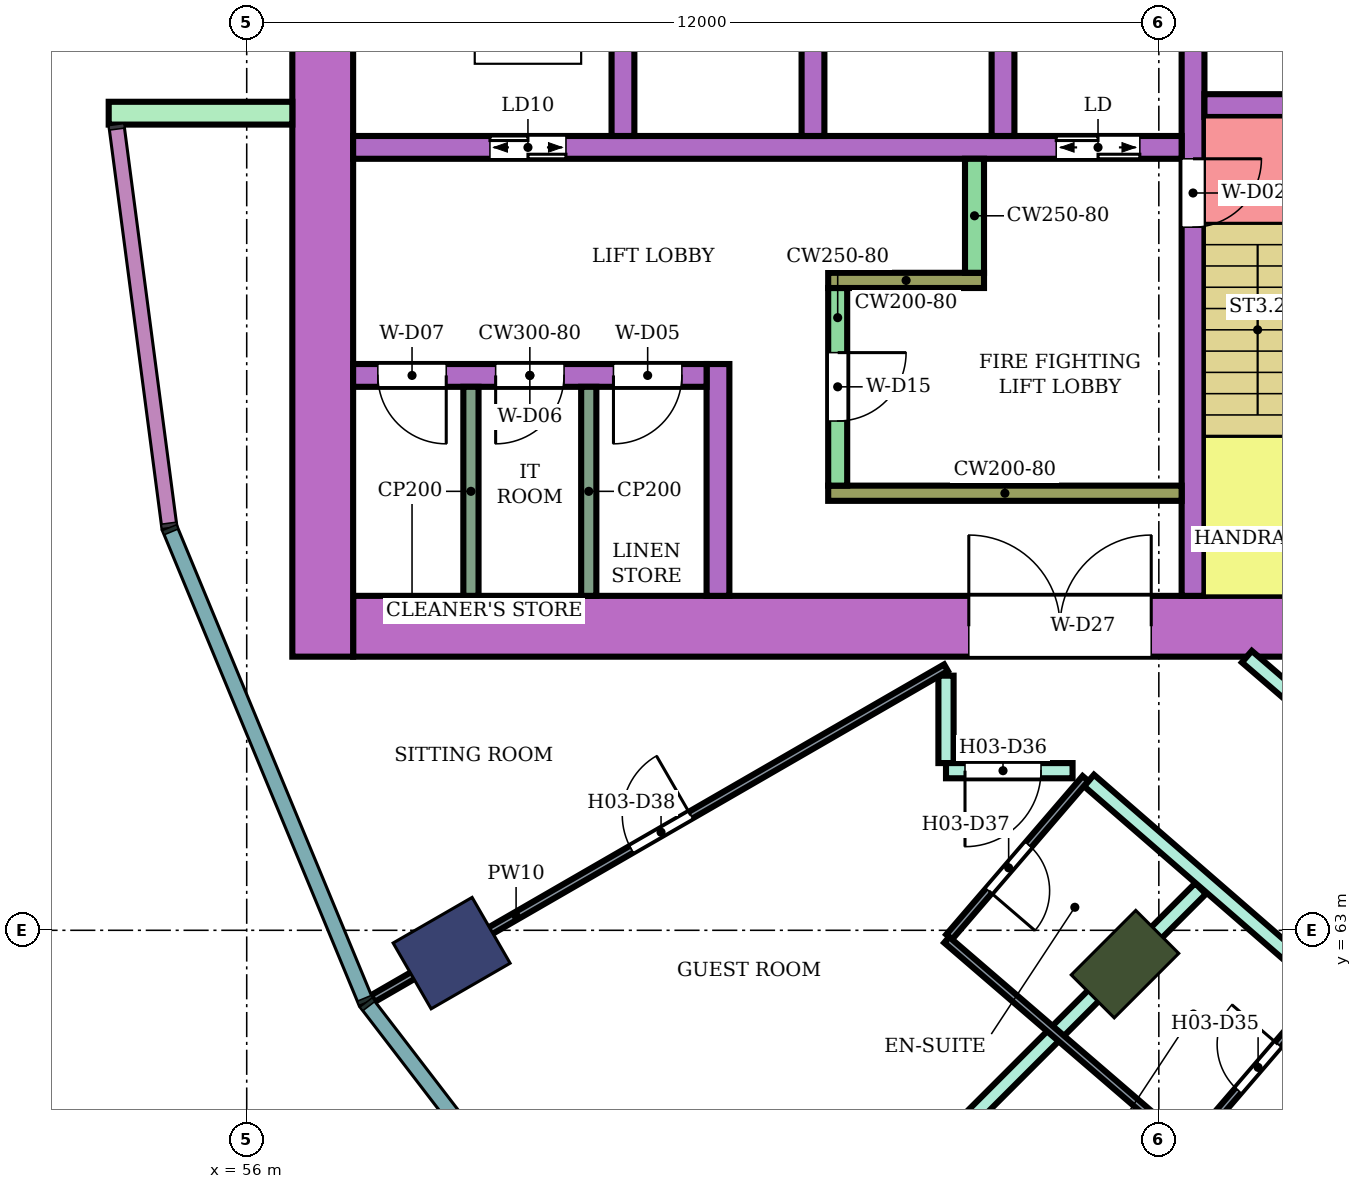
"""IFC4 building model, lengths in metres.
Left out: names, types, materials, properties, quantities, classifications, styles, units other than length and angle.
Written with IfcOpenShell. Run it as: python <this file> out.ifc"""

import sys

from ifc_helpers import new_model, si_unit, direction, frame, frame_2d, origin, origin_2d, place, context, subcontext, project, spatial, rectangle, extrude, element, fill, save


model = new_model("IFC4")
c1 = context("Model", 3, precision=1e-05, world=origin(), true_north=direction((0.0, 1.0)))
c2 = subcontext(c1, "Body", "Model", "MODEL_VIEW")
j1 = project(units=[si_unit("LENGTHUNIT", "METRE"), si_unit("PLANEANGLEUNIT", "RADIAN")], contexts=[c1])
p1 = place(None, origin())
s1 = spatial("IfcSite", under=j1, at=p1, CompositionType="ELEMENT")
p2 = place(p1, origin())
s2 = spatial("IfcBuilding", under=s1, at=p2, CompositionType="ELEMENT")
p3 = place(p2, frame((0.0, 0.0, 51.6)))
s3 = spatial("IfcBuildingStorey", under=s2, at=p3, CompositionType="ELEMENT", Elevation=51.6)
p4 = place(p3, frame((58.696, 62.7, 0.0), z_axis=(0.0, 0.0, 1.0), x_axis=(-0.866025403784, -0.5, 0.0)))
e1 = element("IfcColumn", 1, at=p4, inside=s3, PredefinedType="COLUMN", context=c2, shape_type="SweptSolid", body=[
    extrude(rectangle(XDim=1.2, YDim=1.0, at=origin_2d()), origin(), (0.0, 0.0, 1.0), 3.8),
])
p5 = place(p3, frame((67.555, 62.555, 0.0), z_axis=(0.0, 0.0, 1.0), x_axis=(-0.707106781187, -0.707106781187, 0.0)))
e2 = element("IfcColumn", 2, at=p5, inside=s3, PredefinedType="COLUMN", context=c2, shape_type="SweptSolid", body=[
    extrude(rectangle(XDim=1.2, YDim=0.8, at=origin_2d()), origin(), (0.0, 0.0, 1.0), 3.8),
])
p6 = place(p3, frame((72.1, 67.0, 0.0), z_axis=(0.0, 0.0, 1.0), x_axis=(-1.0, 0.0, 0.0)))
e3 = element("IfcWall", 3, at=p6, inside=s3, PredefinedType="SHEAR", context=c2, shape_type="SweptSolid", body=[
    extrude(rectangle(XDim=14.7, YDim=0.8, at=frame_2d((7.35, 0.0))), origin(), (0.0, 0.0, 1.0), 3.48),
])
p7 = place(p6, frame((4.2, 0.0, 0.0)))
e4 = element("IfcOpeningElement", 4, at=p7, cuts=e3, PredefinedType="OPENING", context=c2, shape_type="SweptSolid", body=[
    extrude(rectangle(XDim=2.4, YDim=2.4, at=frame_2d((1.2, 1.2))), frame((0.0, 0.41, 0.0), z_axis=(0.0, -1.0, 0.0), x_axis=(1.0, 0.0, 0.0)), (0.0, 0.0, 1.0), 0.82),
])
p8 = place(p3, frame((57.0, 83.4, 0.0), z_axis=(0.0, 0.0, 1.0), x_axis=(0.0, -1.0, 0.0)))
e5 = element("IfcWall", 5, at=p8, inside=s3, PredefinedType="SHEAR", context=c2, shape_type="SweptSolid", body=[
    extrude(rectangle(XDim=16.8, YDim=0.8, at=frame_2d((8.4, 0.0))), origin(), (0.0, 0.0, 1.0), 3.48),
])
p9 = place(p3, frame((68.45, 75.0, 0.0), z_axis=(0.0, 0.0, 1.0), x_axis=(0.0, -1.0, 0.0)))
e6 = element("IfcWall", 6, at=p9, inside=s3, PredefinedType="SHEAR", context=c2, shape_type="SweptSolid", body=[
    extrude(rectangle(XDim=7.6, YDim=0.3, at=frame_2d((3.8, 0.0))), origin(), (0.0, 0.0, 1.0), 3.48),
])
p10 = place(p9, frame((1.85, 0.0, 0.0)))
e7 = element("IfcOpeningElement", 7, at=p10, cuts=e6, PredefinedType="OPENING", context=c2, shape_type="SweptSolid", body=[
    extrude(rectangle(XDim=0.9, YDim=2.1, at=frame_2d((0.45, 1.05))), frame((0.0, 0.16, 0.0), z_axis=(0.0, -1.0, 0.0), x_axis=(1.0, 0.0, 0.0)), (0.0, 0.0, 1.0), 0.32),
])
p11 = place(p3, frame((71.65, 73.85, 0.0), z_axis=(0.0, 0.0, 1.0), x_axis=(-1.0, 0.0, 0.0)))
e8 = element("IfcWall", 8, at=p11, inside=s3, PredefinedType="SHEAR", context=c2, shape_type="SweptSolid", body=[
    extrude(rectangle(XDim=3.05, YDim=0.3, at=frame_2d((1.525, 0.0))), origin(), (0.0, 0.0, 1.0), 3.48),
])
p12 = place(p11, frame((1.1, 0.0, 0.0)))
e9 = element("IfcOpeningElement", 9, at=p12, cuts=e8, PredefinedType="OPENING", context=c2, shape_type="SweptSolid", body=[
    extrude(rectangle(XDim=0.7, YDim=2.0, at=frame_2d((0.35, 1.0))), frame((0.0, 0.16, 0.0), z_axis=(0.0, -1.0, 0.0), x_axis=(1.0, 0.0, 0.0)), (0.0, 0.0, 1.0), 0.32),
])
p13 = place(p3, frame((68.3, 73.3, 0.0), z_axis=(0.0, 0.0, 1.0), x_axis=(-1.0, 0.0, 0.0)))
e10 = element("IfcWall", 10, at=p13, inside=s3, PredefinedType="SHEAR", context=c2, shape_type="SweptSolid", body=[
    extrude(rectangle(XDim=10.9, YDim=0.3, at=frame_2d((5.45, 0.0))), origin(), (0.0, 0.0, 1.0), 3.48),
])
p14 = place(p13, frame((0.55, 0.0, 0.0)))
e11 = element("IfcOpeningElement", 11, at=p14, cuts=e10, PredefinedType="OPENING", context=c2, shape_type="SweptSolid", body=[
    extrude(rectangle(XDim=1.1, YDim=2.1, at=frame_2d((0.55, 1.05))), frame((0.0, 0.16, 0.0), z_axis=(0.0, -1.0, 0.0), x_axis=(1.0, 0.0, 0.0)), (0.0, 0.0, 1.0), 0.32),
])
p15 = place(p13, frame((8.1, 0.0, 0.0)))
e12 = element("IfcOpeningElement", 12, at=p15, cuts=e10, PredefinedType="OPENING", context=c2, shape_type="SweptSolid", body=[
    extrude(rectangle(XDim=1.0, YDim=2.1, at=frame_2d((0.5, 1.05))), frame((0.0, 0.16, 0.0), z_axis=(0.0, -1.0, 0.0), x_axis=(1.0, 0.0, 0.0)), (0.0, 0.0, 1.0), 0.32),
])
for number, where, z_axis, x_axis in (
    (13, (65.95, 76.0, 0.0), (0.0, 0.0, 1.0), (0.0, -1.0, 0.0)),
    (14, (63.45, 76.0, 0.0), (0.0, 0.0, 1.0), (0.0, -1.0, 0.0)),
    (15, (60.95, 76.0, 0.0), (0.0, 0.0, 1.0), (0.0, -1.0, 0.0)),
):
    element("IfcWall", number, at=place(p3, frame(where, z_axis=z_axis, x_axis=x_axis)), inside=s3, PredefinedType="SHEAR", context=c2, shape_type="SweptSolid", body=[
        extrude(rectangle(XDim=2.55, YDim=0.3, at=frame_2d((1.275, 0.0))), origin(), (0.0, 0.0, 1.0), 3.48),
    ])
p16 = place(p3, frame((68.3, 68.75, 0.0), z_axis=(0.0, 0.0, 1.0), x_axis=(-1.0, 0.0, 0.0)))
e16 = element("IfcWall", 16, at=p16, inside=s3, PredefinedType="SHEAR", context=c2, shape_type="SweptSolid", body=[
    extrude(rectangle(XDim=4.65, YDim=0.2, at=frame_2d((2.325, 0.0))), origin(), (0.0, 0.0, 1.0), 3.48),
])
p17 = place(p3, frame((63.775, 71.45, 0.0), z_axis=(0.0, 0.0, 1.0), x_axis=(0.0, -1.0, 0.0)))
e17 = element("IfcWall", 17, at=p17, inside=s3, PredefinedType="SHEAR", context=c2, shape_type="SweptSolid", body=[
    extrude(rectangle(XDim=2.6, YDim=0.25, at=frame_2d((1.3, 0.0))), origin(), (0.0, 0.0, 1.0), 3.48),
])
p18 = place(p17, frame((0.85, 0.0, 0.0)))
e18 = element("IfcOpeningElement", 18, at=p18, cuts=e17, PredefinedType="OPENING", context=c2, shape_type="SweptSolid", body=[
    extrude(rectangle(XDim=0.9, YDim=2.1, at=frame_2d((0.45, 1.05))), frame((0.0, 0.135, 0.0), z_axis=(0.0, -1.0, 0.0), x_axis=(1.0, 0.0, 0.0)), (0.0, 0.0, 1.0), 0.27),
])
p19 = place(p3, frame((65.7, 71.55, 0.0), z_axis=(0.0, 0.0, 1.0), x_axis=(-1.0, 0.0, 0.0)))
e19 = element("IfcWall", 19, at=p19, inside=s3, PredefinedType="SHEAR", context=c2, shape_type="SweptSolid", body=[
    extrude(rectangle(XDim=2.05, YDim=0.2, at=frame_2d((1.025, 0.0))), origin(), (0.0, 0.0, 1.0), 3.48),
])
p20 = place(p3, frame((65.575, 73.15, 0.0), z_axis=(0.0, 0.0, 1.0), x_axis=(0.0, -1.0, 0.0)))
e20 = element("IfcWall", 20, at=p20, inside=s3, PredefinedType="SHEAR", context=c2, shape_type="SweptSolid", body=[
    extrude(rectangle(XDim=1.5, YDim=0.25, at=frame_2d((0.75, 0.0))), origin(), (0.0, 0.0, 1.0), 3.48),
])
p21 = place(p3, frame((62.2, 70.45, 0.0), z_axis=(0.0, 0.0, 1.0), x_axis=(0.0, -1.0, 0.0)))
e21 = element("IfcWall", 21, at=p21, inside=s3, PredefinedType="SHEAR", context=c2, shape_type="SweptSolid", body=[
    extrude(rectangle(XDim=3.05, YDim=0.3, at=frame_2d((1.525, 0.0))), origin(), (0.0, 0.0, 1.0), 3.48),
])
p22 = place(p3, frame((62.05, 70.3, 0.0), z_axis=(0.0, 0.0, 1.0), x_axis=(-1.0, 0.0, 0.0)))
e22 = element("IfcWall", 22, at=p22, inside=s3, PredefinedType="SHEAR", context=c2, shape_type="SweptSolid", body=[
    extrude(rectangle(XDim=4.65, YDim=0.3, at=frame_2d((2.325, 0.0))), origin(), (0.0, 0.0, 1.0), 3.48),
])
p23 = place(p22, frame((0.325, 0.0, 0.0)))
e23 = element("IfcOpeningElement", 23, at=p23, cuts=e22, PredefinedType="OPENING", context=c2, shape_type="SweptSolid", body=[
    extrude(rectangle(XDim=0.9, YDim=2.1, at=frame_2d((0.45, 1.05))), frame((0.0, 0.16, 0.0), z_axis=(0.0, -1.0, 0.0), x_axis=(1.0, 0.0, 0.0)), (0.0, 0.0, 1.0), 0.32),
])
p24 = place(p22, frame((1.875, 0.0, 0.0)))
e24 = element("IfcOpeningElement", 24, at=p24, cuts=e22, PredefinedType="OPENING", context=c2, shape_type="SweptSolid", body=[
    extrude(rectangle(XDim=0.9, YDim=2.1, at=frame_2d((0.45, 1.05))), frame((0.0, 0.16, 0.0), z_axis=(0.0, -1.0, 0.0), x_axis=(1.0, 0.0, 0.0)), (0.0, 0.0, 1.0), 0.32),
])
p25 = place(p22, frame((3.425, 0.0, 0.0)))
e25 = element("IfcOpeningElement", 25, at=p25, cuts=e22, PredefinedType="OPENING", context=c2, shape_type="SweptSolid", body=[
    extrude(rectangle(XDim=0.9, YDim=2.1, at=frame_2d((0.45, 1.05))), frame((0.0, 0.16, 0.0), z_axis=(0.0, -1.0, 0.0), x_axis=(1.0, 0.0, 0.0)), (0.0, 0.0, 1.0), 0.32),
])
p26 = place(p3, frame((56.6, 73.75, 0.0), z_axis=(0.0, 0.0, 1.0), x_axis=(-1.0, 0.0, 0.0)))
e26 = element("IfcWall", 26, at=p26, inside=s3, PredefinedType="NOTDEFINED", context=c2, shape_type="SweptSolid", body=[
    extrude(rectangle(XDim=2.416, YDim=0.3, at=frame_2d((1.208, 0.0))), origin(), (0.0, 0.0, 1.0), 3.8),
])
p27 = place(p3, frame((63.596, 58.596, 0.0), z_axis=(0.0, 0.0, 1.0), x_axis=(0.707106781187, 0.707106781187, 0.0)))
e27 = element("IfcWall", 27, at=p27, inside=s3, PredefinedType="PARTITIONING", context=c2, shape_type="SweptSolid", body=[
    extrude(rectangle(XDim=7.005, YDim=0.2, at=frame_2d((3.503, 0.0))), origin(), (0.0, 0.0, 1.0), 3.35),
])
p28 = place(p3, frame((65.2, 65.2, 0.0), z_axis=(0.0, 0.0, 1.0), x_axis=(0.0, 1.0, 0.0)))
e28 = element("IfcWall", 28, at=p28, inside=s3, PredefinedType="PARTITIONING", context=c2, shape_type="SweptSolid", body=[
    extrude(rectangle(XDim=1.15, YDim=0.2, at=frame_2d((0.575, 0.0))), origin(), (0.0, 0.0, 1.0), 3.35),
])
p29 = place(p3, frame((65.2, 65.1, 0.0), z_axis=(0.0, 0.0, 1.0), x_axis=(1.0, 0.0, 0.0)))
e29 = element("IfcWall", 29, at=p29, inside=s3, PredefinedType="PARTITIONING", context=c2, shape_type="SweptSolid", body=[
    extrude(rectangle(XDim=1.665, YDim=0.2, at=frame_2d((0.833, 0.0))), origin(), (0.0, 0.0, 1.0), 3.35),
])
p30 = place(p29, frame((0.25, 0.0, 0.0)))
e30 = element("IfcOpeningElement", 30, at=p30, cuts=e29, PredefinedType="OPENING", context=c2, shape_type="SweptSolid", body=[
    extrude(rectangle(XDim=1.0, YDim=2.1, at=frame_2d((0.5, 1.05))), frame((0.0, 0.11, 0.0), z_axis=(0.0, -1.0, 0.0), x_axis=(1.0, 0.0, 0.0)), (0.0, 0.0, 1.0), 0.22),
])
p31 = place(p3, frame((67.081, 64.971, 0.0), z_axis=(0.0, 0.0, 1.0), x_axis=(0.755031061605, -0.65568902386, 0.0)))
e31 = element("IfcWall", 31, at=p31, inside=s3, PredefinedType="PARTITIONING", context=c2, shape_type="SweptSolid", body=[
    extrude(rectangle(XDim=6.186, YDim=0.2, at=frame_2d((3.093, 0.0))), origin(), (0.0, 0.0, 1.0), 3.35),
])
p32 = place(p31, frame((4.755, 0.0, 0.0)))
e32 = element("IfcOpeningElement", 32, at=p32, cuts=e31, PredefinedType="OPENING", context=c2, shape_type="SweptSolid", body=[
    extrude(rectangle(XDim=1.0, YDim=2.1, at=frame_2d((0.5, 1.05))), frame((0.0, 0.11, 0.0), z_axis=(0.0, -1.0, 0.0), x_axis=(1.0, 0.0, 0.0)), (0.0, 0.0, 1.0), 0.22),
])
p33 = place(p3, frame((67.095, 52.662, 0.0), z_axis=(0.0, 0.0, 1.0), x_axis=(0.500247659952, 0.865882370021, 0.0)))
e33 = element("IfcWall", 33, at=p33, inside=s3, PredefinedType="PARTITIONING", context=c2, shape_type="SweptSolid", body=[
    extrude(rectangle(XDim=9.375, YDim=0.2, at=frame_2d((4.688, 0.0))), origin(), (0.0, 0.0, 1.0), 3.35),
])
p34 = place(p3, frame((69.158, 66.6, 0.0), z_axis=(0.0, 0.0, 1.0), x_axis=(0.757976058094, -0.652282373943, 0.0)))
e34 = element("IfcWall", 34, at=p34, inside=s3, PredefinedType="PARTITIONING", context=c2, shape_type="SweptSolid", body=[
    extrude(rectangle(XDim=5.16, YDim=0.2, at=frame_2d((2.58, 0.0))), origin(), (0.0, 0.0, 1.0), 3.35),
])
p35 = place(p34, frame((1.6, 0.0, 0.0)))
e35 = element("IfcOpeningElement", 35, at=p35, cuts=e34, PredefinedType="OPENING", context=c2, shape_type="SweptSolid", body=[
    extrude(rectangle(XDim=1.0, YDim=2.1, at=frame_2d((0.5, 1.05))), frame((0.0, 0.11, 0.0), z_axis=(0.0, -1.0, 0.0), x_axis=(1.0, 0.0, 0.0)), (0.0, 0.0, 1.0), 0.22),
])
p36 = place(p3, frame((57.659, 62.101, 0.0), z_axis=(0.0, 0.0, 1.0), x_axis=(0.86602264145, 0.500004784474, 0.0)))
e36 = element("IfcWall", 36, at=p36, inside=s3, PredefinedType="PARTITIONING", context=c2, shape_type="SweptSolid", body=[
    extrude(rectangle(XDim=8.708, YDim=0.1, at=frame_2d((4.354, 0.0))), origin(), (0.0, 0.0, 1.0), 3.35),
])
p37 = place(p36, frame((3.929, 0.0, 0.0)))
e37 = element("IfcOpeningElement", 37, at=p37, cuts=e36, PredefinedType="OPENING", context=c2, shape_type="SweptSolid", body=[
    extrude(rectangle(XDim=0.9, YDim=2.1, at=frame_2d((0.45, 1.05))), frame((0.0, 0.06, 0.0), z_axis=(0.0, -1.0, 0.0), x_axis=(1.0, 0.0, 0.0)), (0.0, 0.0, 1.0), 0.12),
])
p38 = place(p3, frame((65.242, 62.912, 0.0), z_axis=(0.0, 0.0, 1.0), x_axis=(0.652069888227, 0.758158862553, 0.0)))
e38 = element("IfcWall", 38, at=p38, inside=s3, PredefinedType="PARTITIONING", context=c2, shape_type="SweptSolid", body=[
    extrude(rectangle(XDim=2.75, YDim=0.1, at=frame_2d((1.375, 0.0))), origin(), (0.0, 0.0, 1.0), 3.35),
])
p39 = place(p38, frame((0.8, 0.0, 0.0)))
e39 = element("IfcOpeningElement", 39, at=p39, cuts=e38, PredefinedType="OPENING", context=c2, shape_type="SweptSolid", body=[
    extrude(rectangle(XDim=0.8, YDim=2.1, at=frame_2d((0.4, 1.05))), frame((0.0, 0.06, 0.0), z_axis=(0.0, -1.0, 0.0), x_axis=(1.0, 0.0, 0.0)), (0.0, 0.0, 1.0), 0.12),
])
p40 = place(p3, frame((65.209, 62.875, 0.0), z_axis=(0.0, 0.0, 1.0), x_axis=(0.757930378138, -0.652335451969, 0.0)))
e40 = element("IfcWall", 40, at=p40, inside=s3, PredefinedType="PARTITIONING", context=c2, shape_type="SweptSolid", body=[
    extrude(rectangle(XDim=4.15, YDim=0.1, at=frame_2d((2.075, 0.0))), origin(), (0.0, 0.0, 1.0), 3.35),
])
p41 = place(p3, frame((68.393, 60.135, 0.0), z_axis=(0.0, 0.0, 1.0), x_axis=(0.652061182569, 0.758166349944, 0.0)))
e41 = element("IfcWall", 41, at=p41, inside=s3, PredefinedType="PARTITIONING", context=c2, shape_type="SweptSolid", body=[
    extrude(rectangle(XDim=2.69, YDim=0.1, at=frame_2d((1.345, 0.0))), origin(), (0.0, 0.0, 1.0), 3.35),
])
p42 = place(p41, frame((1.0, 0.0, 0.0)))
e42 = element("IfcOpeningElement", 42, at=p42, cuts=e41, PredefinedType="OPENING", context=c2, shape_type="SweptSolid", body=[
    extrude(rectangle(XDim=0.8, YDim=2.1, at=frame_2d((0.4, 1.05))), frame((0.0, 0.06, 0.0), z_axis=(0.0, -1.0, 0.0), x_axis=(1.0, 0.0, 0.0)), (0.0, 0.0, 1.0), 0.12),
])
for number, where, z_axis, x_axis in (
    (43, (60.5, 70.15, 0.0), (0.0, 0.0, 1.0), (0.0, -1.0, 0.0)),
    (44, (58.95, 70.15, 0.0), (0.0, 0.0, 1.0), (0.0, -1.0, 0.0)),
):
    element("IfcWall", number, at=place(p3, frame(where, z_axis=z_axis, x_axis=x_axis)), inside=s3, PredefinedType="PARTITIONING", context=c2, shape_type="SweptSolid", body=[
        extrude(rectangle(XDim=2.75, YDim=0.2, at=frame_2d((1.375, 0.0))), origin(), (0.0, 0.0, 1.0), 3.48),
    ])
p43 = place(p42, origin())
e45 = element("IfcDoor", 45, at=p43, inside=s3, OperationType="SINGLE_SWING_RIGHT", PredefinedType="DOOR", context=c2, shape_type="SweptSolid", body=[
    extrude(rectangle(XDim=0.8, YDim=2.1, at=frame_2d((0.4, 1.05))), frame((0.0, 0.025, 0.0), z_axis=(0.0, -1.0, 0.0), x_axis=(1.0, 0.0, 0.0)), (0.0, 0.0, 1.0), 0.05),
])
fill(e42, e45)
p44 = place(p30, frame((1.0, 0.0, 0.0), z_axis=(0.0, 0.0, 1.0), x_axis=(-1.0, 0.0, 0.0)))
e46 = element("IfcDoor", 46, at=p44, inside=s3, OperationType="SINGLE_SWING_RIGHT", PredefinedType="DOOR", context=c2, shape_type="SweptSolid", body=[
    extrude(rectangle(XDim=1.0, YDim=2.1, at=frame_2d((0.5, 1.05))), frame((0.0, 0.025, 0.0), z_axis=(0.0, -1.0, 0.0), x_axis=(1.0, 0.0, 0.0)), (0.0, 0.0, 1.0), 0.05),
])
fill(e30, e46)
p45 = place(p39, frame((0.8, 0.0, 0.0), z_axis=(0.0, 0.0, 1.0), x_axis=(-1.0, 0.0, 0.0)))
e47 = element("IfcDoor", 47, at=p45, inside=s3, OperationType="SINGLE_SWING_RIGHT", PredefinedType="DOOR", context=c2, shape_type="SweptSolid", body=[
    extrude(rectangle(XDim=0.8, YDim=2.1, at=frame_2d((0.4, 1.05))), frame((0.0, 0.025, 0.0), z_axis=(0.0, -1.0, 0.0), x_axis=(1.0, 0.0, 0.0)), (0.0, 0.0, 1.0), 0.05),
])
fill(e39, e47)
p46 = place(p37, origin())
e48 = element("IfcDoor", 48, at=p46, inside=s3, OperationType="SINGLE_SWING_RIGHT", PredefinedType="DOOR", context=c2, shape_type="SweptSolid", body=[
    extrude(rectangle(XDim=0.9, YDim=2.1, at=frame_2d((0.45, 1.05))), frame((0.0, 0.025, 0.0), z_axis=(0.0, -1.0, 0.0), x_axis=(1.0, 0.0, 0.0)), (0.0, 0.0, 1.0), 0.05),
])
fill(e37, e48)
p47 = place(p10, origin())
e49 = element("IfcDoor", 49, at=p47, inside=s3, OperationType="SINGLE_SWING_LEFT", PredefinedType="DOOR", context=c2, shape_type="SweptSolid", body=[
    extrude(rectangle(XDim=0.9, YDim=2.1, at=frame_2d((0.45, 1.05))), frame((0.0, 0.025, 0.0), z_axis=(0.0, -1.0, 0.0), x_axis=(1.0, 0.0, 0.0)), (0.0, 0.0, 1.0), 0.05),
])
fill(e7, e49)
p48 = place(p14, origin())
e50 = element("IfcDoor", 50, at=p48, inside=s3, OperationType="DOUBLE_DOOR_SLIDING", PredefinedType="DOOR", context=c2, shape_type="SweptSolid", body=[
    extrude(rectangle(XDim=1.1, YDim=2.1, at=frame_2d((0.55, 1.05))), frame((0.0, 0.025, 0.0), z_axis=(0.0, -1.0, 0.0), x_axis=(1.0, 0.0, 0.0)), (0.0, 0.0, 1.0), 0.05),
])
fill(e11, e50)
p49 = place(p15, origin())
e51 = element("IfcDoor", 51, at=p49, inside=s3, OperationType="DOUBLE_DOOR_SLIDING", PredefinedType="DOOR", context=c2, shape_type="SweptSolid", body=[
    extrude(rectangle(XDim=1.0, YDim=2.1, at=frame_2d((0.5, 1.05))), frame((0.0, 0.025, 0.0), z_axis=(0.0, -1.0, 0.0), x_axis=(1.0, 0.0, 0.0)), (0.0, 0.0, 1.0), 0.05),
])
fill(e12, e51)
p50 = place(p18, origin())
e52 = element("IfcDoor", 52, at=p50, inside=s3, OperationType="SINGLE_SWING_LEFT", PredefinedType="DOOR", context=c2, shape_type="SweptSolid", body=[
    extrude(rectangle(XDim=0.9, YDim=2.1, at=frame_2d((0.45, 1.05))), frame((0.0, 0.025, 0.0), z_axis=(0.0, -1.0, 0.0), x_axis=(1.0, 0.0, 0.0)), (0.0, 0.0, 1.0), 0.05),
])
fill(e18, e52)
p51 = place(p23, origin())
e53 = element("IfcDoor", 53, at=p51, inside=s3, OperationType="SINGLE_SWING_RIGHT", PredefinedType="DOOR", context=c2, shape_type="SweptSolid", body=[
    extrude(rectangle(XDim=0.9, YDim=2.1, at=frame_2d((0.45, 1.05))), frame((0.0, 0.025, 0.0), z_axis=(0.0, -1.0, 0.0), x_axis=(1.0, 0.0, 0.0)), (0.0, 0.0, 1.0), 0.05),
])
fill(e23, e53)
p52 = place(p24, origin())
e54 = element("IfcDoor", 54, at=p52, inside=s3, OperationType="SINGLE_SWING_RIGHT", PredefinedType="DOOR", context=c2, shape_type="SweptSolid", body=[
    extrude(rectangle(XDim=0.9, YDim=2.1, at=frame_2d((0.45, 1.05))), frame((0.0, 0.025, 0.0), z_axis=(0.0, -1.0, 0.0), x_axis=(1.0, 0.0, 0.0)), (0.0, 0.0, 1.0), 0.05),
])
fill(e24, e54)
p53 = place(p25, origin())
e55 = element("IfcDoor", 55, at=p53, inside=s3, OperationType="SINGLE_SWING_LEFT", PredefinedType="DOOR", context=c2, shape_type="SweptSolid", body=[
    extrude(rectangle(XDim=0.9, YDim=2.1, at=frame_2d((0.45, 1.05))), frame((0.0, 0.025, 0.0), z_axis=(0.0, -1.0, 0.0), x_axis=(1.0, 0.0, 0.0)), (0.0, 0.0, 1.0), 0.05),
])
fill(e25, e55)
p54 = place(p7, frame((2.4, 0.0, 0.0), z_axis=(0.0, 0.0, 1.0), x_axis=(-1.0, 0.0, 0.0)))
e56 = element("IfcDoor", 56, at=p54, inside=s3, OperationType="DOUBLE_DOOR_SINGLE_SWING", PredefinedType="DOOR", context=c2, shape_type="SweptSolid", body=[
    extrude(rectangle(XDim=2.4, YDim=2.4, at=frame_2d((1.2, 1.2))), frame((0.0, 0.025, 0.0), z_axis=(0.0, -1.0, 0.0), x_axis=(1.0, 0.0, 0.0)), (0.0, 0.0, 1.0), 0.05),
])
fill(e4, e56)
save(model, sys.argv[1])
